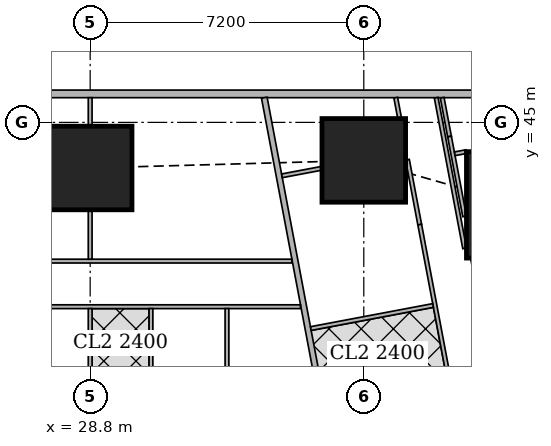
"""IFC4 building model, lengths in metres.
Left out: names, types, materials, properties, quantities, classifications, styles, units other than length and angle.
Written with IfcOpenShell. Run it as: python <this file> out.ifc"""

import sys

from ifc_helpers import new_model, si_unit, direction, frame, frame_2d, origin, origin_2d, place, context, subcontext, project, spatial, rectangle, extrude, element, fill, save


model = new_model("IFC4")
c1 = context("Model", 3, precision=1e-05, world=origin(), true_north=direction((0.0, 1.0)))
c2 = subcontext(c1, "Body", "Model", "MODEL_VIEW")
j1 = project(units=[si_unit("LENGTHUNIT", "METRE"), si_unit("PLANEANGLEUNIT", "RADIAN")], contexts=[c1])
p1 = place(None, origin())
s1 = spatial("IfcSite", under=j1, at=p1, CompositionType="ELEMENT")
p2 = place(p1, origin())
s2 = spatial("IfcBuilding", under=s1, at=p2, CompositionType="ELEMENT")
p3 = place(p2, frame((0.0, 0.0, 100.4)))
s3 = spatial("IfcBuildingStorey", under=s2, at=p3, CompositionType="ELEMENT", Elevation=100.4)
p4 = place(p3, frame((40.102, 42.83, 0.0), z_axis=(0.0, 0.0, 1.0), x_axis=(1.0, 0.0, 0.0)))
e1 = element("IfcColumn", 1, at=p4, inside=s3, PredefinedType="COLUMN", context=c2, shape_type="SweptSolid", body=[
    extrude(rectangle(XDim=2.8, YDim=2.8, at=origin_2d()), origin(), (0.0, 0.0, 1.0), 3.75),
])
for number, where, z_axis, x_axis in (
    (2, (28.8, 43.8, 0.0), (0.0, 0.0, 1.0), (1.0, 0.0, 0.0)),
    (3, (36.0, 44.0, 0.0), (0.0, 0.0, 1.0), (1.0, 0.0, 0.0)),
):
    element("IfcColumn", number, at=place(p3, frame(where, z_axis=z_axis, x_axis=x_axis)), inside=s3, PredefinedType="COLUMN", context=c2, shape_type="SweptSolid", body=[
        extrude(rectangle(XDim=2.2, YDim=2.2, at=origin_2d()), origin(), (0.0, 0.0, 1.0), 3.75),
    ])
p5 = place(p3, frame((40.106, 45.75, 0.0), z_axis=(0.0, 0.0, 1.0), x_axis=(-1.0, 0.0, 0.0)))
e4 = element("IfcWall", 4, at=p5, inside=s3, PredefinedType="SOLIDWALL", context=c2, shape_type="SweptSolid", body=[
    extrude(rectangle(XDim=37.943, YDim=0.2, at=frame_2d((18.971, 0.0))), origin(), (0.0, 0.0, 1.0), 3.5),
])
p6 = place(p5, frame((8.606, 0.0, 0.9)))
e5 = element("IfcOpeningElement", 5, at=p6, cuts=e4, PredefinedType="OPENING", context=c2, shape_type="SweptSolid", body=[
    extrude(rectangle(XDim=1.8, YDim=1.5, at=frame_2d((0.9, 0.75))), frame((0.0, 0.11, 0.0), z_axis=(0.0, -1.0, 0.0), x_axis=(1.0, 0.0, 0.0)), (0.0, 0.0, 1.0), 0.22),
])
p7 = place(p5, frame((12.206, 0.0, 0.9)))
e6 = element("IfcOpeningElement", 6, at=p7, cuts=e4, PredefinedType="OPENING", context=c2, shape_type="SweptSolid", body=[
    extrude(rectangle(XDim=1.8, YDim=1.5, at=frame_2d((0.9, 0.75))), frame((0.0, 0.11, 0.0), z_axis=(0.0, -1.0, 0.0), x_axis=(1.0, 0.0, 0.0)), (0.0, 0.0, 1.0), 0.22),
])
p8 = place(p5, frame((15.806, 0.0, 0.9)))
e7 = element("IfcOpeningElement", 7, at=p8, cuts=e4, PredefinedType="OPENING", context=c2, shape_type="SweptSolid", body=[
    extrude(rectangle(XDim=1.8, YDim=1.5, at=frame_2d((0.9, 0.75))), frame((0.0, 0.11, 0.0), z_axis=(0.0, -1.0, 0.0), x_axis=(1.0, 0.0, 0.0)), (0.0, 0.0, 1.0), 0.22),
])
p9 = place(p5, frame((19.406, 0.0, 0.9)))
e8 = element("IfcOpeningElement", 8, at=p9, cuts=e4, PredefinedType="OPENING", context=c2, shape_type="SweptSolid", body=[
    extrude(rectangle(XDim=1.8, YDim=1.5, at=frame_2d((0.9, 0.75))), frame((0.0, 0.11, 0.0), z_axis=(0.0, -1.0, 0.0), x_axis=(1.0, 0.0, 0.0)), (0.0, 0.0, 1.0), 0.22),
])
p10 = place(p5, frame((23.006, 0.0, 0.9)))
e9 = element("IfcOpeningElement", 9, at=p10, cuts=e4, PredefinedType="OPENING", context=c2, shape_type="SweptSolid", body=[
    extrude(rectangle(XDim=1.8, YDim=1.5, at=frame_2d((0.9, 0.75))), frame((0.0, 0.11, 0.0), z_axis=(0.0, -1.0, 0.0), x_axis=(1.0, 0.0, 0.0)), (0.0, 0.0, 1.0), 0.22),
])
p11 = place(p5, frame((26.606, 0.0, 0.9)))
e10 = element("IfcOpeningElement", 10, at=p11, cuts=e4, PredefinedType="OPENING", context=c2, shape_type="SweptSolid", body=[
    extrude(rectangle(XDim=1.8, YDim=1.5, at=frame_2d((0.9, 0.75))), frame((0.0, 0.11, 0.0), z_axis=(0.0, -1.0, 0.0), x_axis=(1.0, 0.0, 0.0)), (0.0, 0.0, 1.0), 0.22),
])
p12 = place(p3, frame((33.382, 45.65, 0.0), z_axis=(0.0, 0.0, 1.0), x_axis=(0.185593544777, -0.982626600565, 0.0)))
e11 = element("IfcWall", 11, at=p12, inside=s3, PredefinedType="SOLIDWALL", context=c2, shape_type="SweptSolid", body=[
    extrude(rectangle(XDim=47.118, YDim=0.15, at=frame_2d((23.559, 0.0))), origin(), (0.0, 0.0, 1.0), 2.2),
])
p13 = place(p12, frame((10.662, 0.0, 0.0)))
e12 = element("IfcOpeningElement", 12, at=p13, cuts=e11, PredefinedType="OPENING", context=c2, shape_type="SweptSolid", body=[
    extrude(rectangle(XDim=1.0, YDim=2.1, at=frame_2d((0.5, 1.05))), frame((0.0, 0.085, 0.0), z_axis=(0.0, -1.0, 0.0), x_axis=(1.0, 0.0, 0.0)), (0.0, 0.0, 1.0), 0.17),
])
p14 = place(p12, frame((15.237, 0.0, 0.0)))
e13 = element("IfcOpeningElement", 13, at=p14, cuts=e11, PredefinedType="OPENING", context=c2, shape_type="SweptSolid", body=[
    extrude(rectangle(XDim=1.0, YDim=2.1, at=frame_2d((0.5, 1.05))), frame((0.0, 0.085, 0.0), z_axis=(0.0, -1.0, 0.0), x_axis=(1.0, 0.0, 0.0)), (0.0, 0.0, 1.0), 0.17),
])
p15 = place(p12, frame((27.341, 0.0, 0.0)))
e14 = element("IfcOpeningElement", 14, at=p15, cuts=e11, PredefinedType="OPENING", context=c2, shape_type="SweptSolid", body=[
    extrude(rectangle(XDim=1.0, YDim=2.1, at=frame_2d((0.5, 1.05))), frame((0.0, 0.085, 0.0), z_axis=(0.0, -1.0, 0.0), x_axis=(1.0, 0.0, 0.0)), (0.0, 0.0, 1.0), 0.17),
])
p16 = place(p12, frame((33.833, 0.0, 0.0)))
e15 = element("IfcOpeningElement", 15, at=p16, cuts=e11, PredefinedType="OPENING", context=c2, shape_type="SweptSolid", body=[
    extrude(rectangle(XDim=1.0, YDim=2.1, at=frame_2d((0.5, 1.05))), frame((0.0, 0.085, 0.0), z_axis=(0.0, -1.0, 0.0), x_axis=(1.0, 0.0, 0.0)), (0.0, 0.0, 1.0), 0.17),
])
p17 = place(p3, frame((38.654, 41.686, 0.0), z_axis=(0.0, 0.0, 1.0), x_axis=(-0.185676896978, 0.982610853761, 0.0)))
e16 = element("IfcWall", 16, at=p17, inside=s3, PredefinedType="PARTITIONING", context=c2, shape_type="SweptSolid", body=[
    extrude(rectangle(XDim=4.034, YDim=0.1, at=frame_2d((2.017, 0.0))), origin(), (0.0, 0.0, 1.0), 2.05),
])
p18 = place(p3, frame((38.063, 45.65, 0.0), z_axis=(0.0, 0.0, 1.0), x_axis=(0.185677287841, -0.982610779902, 0.0)))
e17 = element("IfcWall", 17, at=p18, inside=s3, PredefinedType="PARTITIONING", context=c2, shape_type="SweptSolid", body=[
    extrude(rectangle(XDim=1.04, YDim=0.1, at=frame_2d((0.52, 0.0))), origin(), (0.0, 0.0, 1.0), 3.5),
])
p19 = place(p3, frame((38.256, 44.628, 0.0), z_axis=(0.0, 0.0, 1.0), x_axis=(0.185674153532, -0.982611372166, 0.0)))
e18 = element("IfcWall", 18, at=p19, inside=s3, PredefinedType="PARTITIONING", context=c2, shape_type="SweptSolid", body=[
    extrude(rectangle(XDim=2.138, YDim=0.1, at=frame_2d((1.069, 0.0))), origin(), (0.0, 0.0, 1.0), 2.05),
])
p20 = place(p3, frame((38.862, 41.42, 0.0), z_axis=(0.0, 0.0, 1.0), x_axis=(0.185332907641, -0.982675792592, 0.0)))
e19 = element("IfcWall", 19, at=p20, inside=s3, PredefinedType="PARTITIONING", context=c2, shape_type="SweptSolid", body=[
    extrude(rectangle(XDim=4.629, YDim=0.1, at=frame_2d((2.314, 0.0))), origin(), (0.0, 0.0, 1.0), 3.5),
])
p21 = place(p20, frame((2.22, 0.0, 0.0)))
e20 = element("IfcOpeningElement", 20, at=p21, cuts=e19, PredefinedType="OPENING", context=c2, shape_type="SweptSolid", body=[
    extrude(rectangle(XDim=0.9, YDim=2.1, at=frame_2d((0.45, 1.05))), frame((0.0, 0.06, 0.0), z_axis=(0.0, -1.0, 0.0), x_axis=(1.0, 0.0, 0.0)), (0.0, 0.0, 1.0), 0.12),
])
p22 = place(p3, frame((36.841, 45.65, 0.0), z_axis=(0.0, 0.0, 1.0), x_axis=(0.185764109712, -0.98259436979, 0.0)))
e21 = element("IfcWall", 21, at=p22, inside=s3, PredefinedType="PARTITIONING", context=c2, shape_type="SweptSolid", body=[
    extrude(rectangle(XDim=0.549, YDim=0.1, at=frame_2d((0.275, 0.0))), origin(), (0.0, 0.0, 1.0), 3.5),
])
p23 = place(p3, frame((37.149, 44.018, 0.0), z_axis=(0.0, 0.0, 1.0), x_axis=(0.185712190756, -0.982604183893, 0.0)))
e22 = element("IfcWall", 22, at=p23, inside=s3, PredefinedType="PARTITIONING", context=c2, shape_type="SweptSolid", body=[
    extrude(rectangle(XDim=1.739, YDim=0.1, at=frame_2d((0.87, 0.0))), origin(), (0.0, 0.0, 1.0), 2.05),
])
p24 = place(p3, frame((37.472, 42.309, 0.0), z_axis=(0.0, 0.0, 1.0), x_axis=(0.185641287362, -0.982617581985, 0.0)))
e23 = element("IfcWall", 23, at=p24, inside=s3, PredefinedType="PARTITIONING", context=c2, shape_type="SweptSolid", body=[
    extrude(rectangle(XDim=4.402, YDim=0.1, at=frame_2d((2.201, 0.0))), origin(), (0.0, 0.0, 1.0), 3.5),
])
p25 = place(p24, frame((2.854, 0.0, 0.0)))
e24 = element("IfcOpeningElement", 24, at=p25, cuts=e23, PredefinedType="OPENING", context=c2, shape_type="SweptSolid", body=[
    extrude(rectangle(XDim=0.9, YDim=2.1, at=frame_2d((0.45, 1.05))), frame((0.0, 0.06, 0.0), z_axis=(0.0, -1.0, 0.0), x_axis=(1.0, 0.0, 0.0)), (0.0, 0.0, 1.0), 0.12),
])
p26 = place(p3, frame((38.692, 44.23, 0.0), z_axis=(0.0, 0.0, 1.0), x_axis=(-0.982944840311, -0.183900627803, 0.0)))
e25 = element("IfcWall", 25, at=p26, inside=s3, PredefinedType="PARTITIONING", context=c2, shape_type="SweptSolid", body=[
    extrude(rectangle(XDim=0.304, YDim=0.1, at=frame_2d((0.152, 0.0))), origin(), (0.0, 0.0, 1.0), 2.05),
])
p27 = place(p3, frame((34.89, 43.791, 0.0), z_axis=(0.0, 0.0, 1.0), x_axis=(-0.982621304855, -0.185621580763, 0.0)))
e26 = element("IfcWall", 26, at=p27, inside=s3, PredefinedType="PARTITIONING", context=c2, shape_type="SweptSolid", body=[
    extrude(rectangle(XDim=1.062, YDim=0.1, at=frame_2d((0.531, 0.0))), origin(), (0.0, 0.0, 1.0), 2.05),
])
p28 = place(p3, frame((37.823, 40.182, 0.0), z_axis=(0.0, 0.0, 1.0), x_axis=(-0.982664729897, -0.18539155487, 0.0)))
e27 = element("IfcWall", 27, at=p28, inside=s3, PredefinedType="PARTITIONING", context=c2, shape_type="SweptSolid", body=[
    extrude(rectangle(XDim=3.274, YDim=0.1, at=frame_2d((1.637, 0.0))), origin(), (0.0, 0.0, 1.0), 3.5),
])
p29 = place(p3, frame((25.2, 41.35, 0.0), z_axis=(0.0, 0.0, 1.0), x_axis=(1.0, 0.0, 0.0)))
e28 = element("IfcWall", 28, at=p29, inside=s3, PredefinedType="PARTITIONING", context=c2, shape_type="SweptSolid", body=[
    extrude(rectangle(XDim=8.908, YDim=0.1, at=frame_2d((4.454, 0.0))), origin(), (0.0, 0.0, 1.0), 3.5),
])
p30 = place(p29, frame((0.2, 0.0, 0.0)))
e29 = element("IfcOpeningElement", 29, at=p30, cuts=e28, PredefinedType="OPENING", context=c2, shape_type="SweptSolid", body=[
    extrude(rectangle(XDim=0.9, YDim=2.1, at=frame_2d((0.45, 1.05))), frame((0.0, 0.06, 0.0), z_axis=(0.0, -1.0, 0.0), x_axis=(1.0, 0.0, 0.0)), (0.0, 0.0, 1.0), 0.12),
])
p31 = place(p29, frame((3.8, 0.0, 0.0)))
e30 = element("IfcOpeningElement", 30, at=p31, cuts=e28, PredefinedType="OPENING", context=c2, shape_type="SweptSolid", body=[
    extrude(rectangle(XDim=0.9, YDim=2.1, at=frame_2d((0.45, 1.05))), frame((0.0, 0.06, 0.0), z_axis=(0.0, -1.0, 0.0), x_axis=(1.0, 0.0, 0.0)), (0.0, 0.0, 1.0), 0.12),
])
p32 = place(p3, frame((25.2, 40.15, 0.0), z_axis=(0.0, 0.0, 1.0), x_axis=(1.0, 0.0, 0.0)))
e31 = element("IfcWall", 31, at=p32, inside=s3, PredefinedType="PARTITIONING", context=c2, shape_type="SweptSolid", body=[
    extrude(rectangle(XDim=9.135, YDim=0.1, at=frame_2d((4.567, 0.0))), origin(), (0.0, 0.0, 1.0), 3.5),
])
p33 = place(p32, frame((0.655, 0.0, 0.0)))
e32 = element("IfcOpeningElement", 32, at=p33, cuts=e31, PredefinedType="OPENING", context=c2, shape_type="SweptSolid", body=[
    extrude(rectangle(XDim=0.9, YDim=2.1, at=frame_2d((0.45, 1.05))), frame((0.0, 0.06, 0.0), z_axis=(0.0, -1.0, 0.0), x_axis=(1.0, 0.0, 0.0)), (0.0, 0.0, 1.0), 0.12),
])
p34 = place(p32, frame((3.95, 0.0, 0.0)))
e33 = element("IfcOpeningElement", 33, at=p34, cuts=e31, PredefinedType="OPENING", context=c2, shape_type="SweptSolid", body=[
    extrude(rectangle(XDim=0.9, YDim=2.1, at=frame_2d((0.45, 1.05))), frame((0.0, 0.06, 0.0), z_axis=(0.0, -1.0, 0.0), x_axis=(1.0, 0.0, 0.0)), (0.0, 0.0, 1.0), 0.12),
])
p35 = place(p32, frame((8.081, 0.0, 0.0)))
e34 = element("IfcOpeningElement", 34, at=p35, cuts=e31, PredefinedType="OPENING", context=c2, shape_type="SweptSolid", body=[
    extrude(rectangle(XDim=0.9, YDim=2.1, at=frame_2d((0.45, 1.05))), frame((0.0, 0.06, 0.0), z_axis=(0.0, -1.0, 0.0), x_axis=(1.0, 0.0, 0.0)), (0.0, 0.0, 1.0), 0.12),
])
p36 = place(p32, frame((2.455, 0.0, 0.0)))
e35 = element("IfcOpeningElement", 35, at=p36, cuts=e31, PredefinedType="OPENING", context=c2, shape_type="SweptSolid", body=[
    extrude(rectangle(XDim=0.9, YDim=2.1, at=frame_2d((0.45, 1.05))), frame((0.0, 0.06, 0.0), z_axis=(0.0, -1.0, 0.0), x_axis=(1.0, 0.0, 0.0)), (0.0, 0.0, 1.0), 0.12),
])
p37 = place(p32, frame((5.75, 0.0, 0.0)))
e36 = element("IfcOpeningElement", 36, at=p37, cuts=e31, PredefinedType="OPENING", context=c2, shape_type="SweptSolid", body=[
    extrude(rectangle(XDim=0.9, YDim=2.1, at=frame_2d((0.45, 1.05))), frame((0.0, 0.06, 0.0), z_axis=(0.0, -1.0, 0.0), x_axis=(1.0, 0.0, 0.0)), (0.0, 0.0, 1.0), 0.12),
])
p38 = place(p3, frame((28.8, 41.4, 0.0), z_axis=(0.0, 0.0, 1.0), x_axis=(0.0, 1.0, 0.0)))
e37 = element("IfcWall", 37, at=p38, inside=s3, PredefinedType="PARTITIONING", context=c2, shape_type="SweptSolid", body=[
    extrude(rectangle(XDim=1.299, YDim=0.1, at=frame_2d((0.649, 0.0))), origin(), (0.0, 0.0, 1.0), 3.5),
])
p39 = place(p3, frame((28.8, 44.901, 0.0), z_axis=(0.0, 0.0, 1.0), x_axis=(0.0, 1.0, 0.0)))
e38 = element("IfcWall", 38, at=p39, inside=s3, PredefinedType="PARTITIONING", context=c2, shape_type="SweptSolid", body=[
    extrude(rectangle(XDim=0.749, YDim=0.1, at=frame_2d((0.375, 0.0))), origin(), (0.0, 0.0, 1.0), 3.5),
])
p40 = place(p3, frame((28.8, 38.301, 0.0), z_axis=(0.0, 0.0, 1.0), x_axis=(0.0, 1.0, 0.0)))
e39 = element("IfcWall", 39, at=p40, inside=s3, PredefinedType="PARTITIONING", context=c2, shape_type="SweptSolid", body=[
    extrude(rectangle(XDim=1.799, YDim=0.1, at=frame_2d((0.899, 0.0))), origin(), (0.0, 0.0, 1.0), 3.5),
])
for number, where, z_axis, x_axis in (
    (40, (32.4, 36.825, 0.0), (0.0, 0.0, 1.0), (0.0, 1.0, 0.0)),
    (41, (30.4, 36.825, 0.0), (0.0, 0.0, 1.0), (0.0, 1.0, 0.0)),
):
    element("IfcWall", number, at=place(p3, frame(where, z_axis=z_axis, x_axis=x_axis)), inside=s3, PredefinedType="PARTITIONING", context=c2, shape_type="SweptSolid", body=[
        extrude(rectangle(XDim=3.275, YDim=0.1, at=frame_2d((1.638, 0.0))), origin(), (0.0, 0.0, 1.0), 3.5),
    ])
p41 = place(p6, origin())
e42 = element("IfcWindow", 42, at=p41, inside=s3, PartitioningType="SINGLE_PANEL", PredefinedType="WINDOW", context=c2, shape_type="SweptSolid", body=[
    extrude(rectangle(XDim=1.8, YDim=1.5, at=frame_2d((0.9, 0.75))), frame((0.0, 0.03, 0.0), z_axis=(0.0, -1.0, 0.0), x_axis=(1.0, 0.0, 0.0)), (0.0, 0.0, 1.0), 0.06),
])
fill(e5, e42)
p42 = place(p7, origin())
e43 = element("IfcWindow", 43, at=p42, inside=s3, PartitioningType="SINGLE_PANEL", PredefinedType="WINDOW", context=c2, shape_type="SweptSolid", body=[
    extrude(rectangle(XDim=1.8, YDim=1.5, at=frame_2d((0.9, 0.75))), frame((0.0, 0.03, 0.0), z_axis=(0.0, -1.0, 0.0), x_axis=(1.0, 0.0, 0.0)), (0.0, 0.0, 1.0), 0.06),
])
fill(e6, e43)
p43 = place(p25, origin())
e44 = element("IfcDoor", 44, at=p43, inside=s3, OperationType="SINGLE_SWING_LEFT", PredefinedType="DOOR", context=c2, shape_type="SweptSolid", body=[
    extrude(rectangle(XDim=0.9, YDim=2.1, at=frame_2d((0.45, 1.05))), frame((0.0, 0.025, 0.0), z_axis=(0.0, -1.0, 0.0), x_axis=(1.0, 0.0, 0.0)), (0.0, 0.0, 1.0), 0.05),
])
fill(e24, e44)
p44 = place(p31, origin())
e45 = element("IfcDoor", 45, at=p44, inside=s3, OperationType="SINGLE_SWING_RIGHT", PredefinedType="DOOR", context=c2, shape_type="SweptSolid", body=[
    extrude(rectangle(XDim=0.9, YDim=2.1, at=frame_2d((0.45, 1.05))), frame((0.0, 0.025, 0.0), z_axis=(0.0, -1.0, 0.0), x_axis=(1.0, 0.0, 0.0)), (0.0, 0.0, 1.0), 0.05),
])
fill(e30, e45)
p45 = place(p34, origin())
e46 = element("IfcDoor", 46, at=p45, inside=s3, OperationType="SINGLE_SWING_RIGHT", PredefinedType="DOOR", context=c2, shape_type="SweptSolid", body=[
    extrude(rectangle(XDim=0.9, YDim=2.1, at=frame_2d((0.45, 1.05))), frame((0.0, 0.025, 0.0), z_axis=(0.0, -1.0, 0.0), x_axis=(1.0, 0.0, 0.0)), (0.0, 0.0, 1.0), 0.05),
])
fill(e33, e46)
p46 = place(p35, origin())
e47 = element("IfcDoor", 47, at=p46, inside=s3, OperationType="SINGLE_SWING_LEFT", PredefinedType="DOOR", context=c2, shape_type="SweptSolid", body=[
    extrude(rectangle(XDim=0.9, YDim=2.1, at=frame_2d((0.45, 1.05))), frame((0.0, 0.025, 0.0), z_axis=(0.0, -1.0, 0.0), x_axis=(1.0, 0.0, 0.0)), (0.0, 0.0, 1.0), 0.05),
])
fill(e34, e47)
p47 = place(p36, origin())
e48 = element("IfcDoor", 48, at=p47, inside=s3, OperationType="SINGLE_SWING_LEFT", PredefinedType="DOOR", context=c2, shape_type="SweptSolid", body=[
    extrude(rectangle(XDim=0.9, YDim=2.1, at=frame_2d((0.45, 1.05))), frame((0.0, 0.025, 0.0), z_axis=(0.0, -1.0, 0.0), x_axis=(1.0, 0.0, 0.0)), (0.0, 0.0, 1.0), 0.05),
])
fill(e35, e48)
p48 = place(p37, origin())
e49 = element("IfcDoor", 49, at=p48, inside=s3, OperationType="SINGLE_SWING_LEFT", PredefinedType="DOOR", context=c2, shape_type="SweptSolid", body=[
    extrude(rectangle(XDim=0.9, YDim=2.1, at=frame_2d((0.45, 1.05))), frame((0.0, 0.025, 0.0), z_axis=(0.0, -1.0, 0.0), x_axis=(1.0, 0.0, 0.0)), (0.0, 0.0, 1.0), 0.05),
])
fill(e36, e49)
save(model, sys.argv[1])
